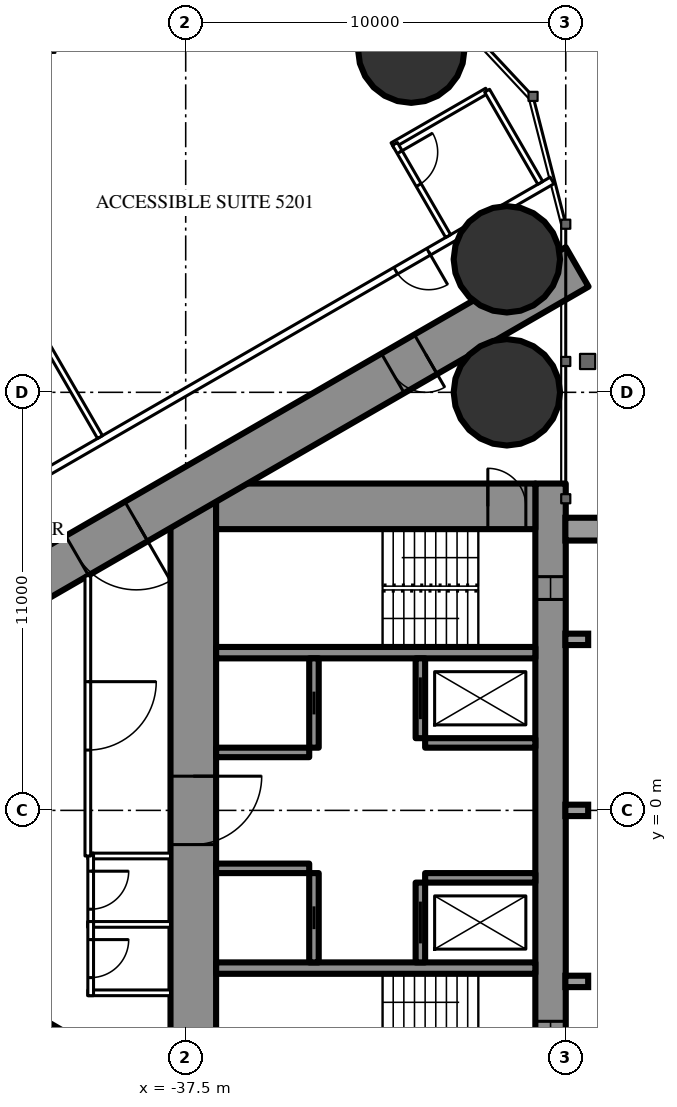
"""IFC4 building model, lengths in metres.
Left out: names, types, materials, properties, quantities, classifications, styles, units other than length and angle.
Written with IfcOpenShell. Run it as: python <this file> out.ifc"""

import sys

from ifc_helpers import new_model, si_unit, direction, frame, frame_2d, origin, origin_2d, place, context, subcontext, project, spatial, rectangle, circle, extrude, element, fill, save


model = new_model("IFC4")
c1 = context("Model", 3, precision=1e-05, world=origin(), true_north=direction((0.0, 1.0)))
c2 = subcontext(c1, "Body", "Model", "MODEL_VIEW")
j1 = project(units=[si_unit("LENGTHUNIT", "METRE"), si_unit("PLANEANGLEUNIT", "RADIAN")], contexts=[c1])
p1 = place(None, origin())
s1 = spatial("IfcSite", under=j1, at=p1, CompositionType="ELEMENT")
p2 = place(p1, origin())
s2 = spatial("IfcBuilding", under=s1, at=p2, CompositionType="ELEMENT")
p3 = place(p2, frame((0.0, 0.0, 194.8)))
s3 = spatial("IfcBuildingStorey", under=s2, at=p3, CompositionType="ELEMENT", Elevation=194.8)
for number, where, z_axis, x_axis in (
    (1, (-31.565, 20.016, 0.0), (0.0, 0.0, 1.0), (1.0, 0.0, 0.0)),
    (2, (-29.05, 11.0, 0.0), (0.0, 0.0, 1.0), (1.0, 0.0, 0.0)),
    (3, (-29.05, 14.5, 0.0), (0.0, 0.0, 1.0), (1.0, 0.0, 0.0)),
):
    element("IfcColumn", number, at=place(p3, frame(where, z_axis=z_axis, x_axis=x_axis)), inside=s3, PredefinedType="COLUMN", context=c2, shape_type="SweptSolid", body=[
        extrude(circle(Radius=1.4, at=origin_2d()), origin(), (0.0, 0.0, 1.0), 3.5),
    ])
p4 = place(p3, frame((-27.9, 8.6, 0.0), z_axis=(0.0, 0.0, 1.0), x_axis=(0.0, -1.0, 0.0)))
e4 = element("IfcWall", 4, at=p4, inside=s3, PredefinedType="SHEAR", context=c2, shape_type="SweptSolid", body=[
    extrude(rectangle(XDim=17.2, YDim=0.8, at=frame_2d((8.6, 0.0))), origin(), (0.0, 0.0, 1.0), 3.5),
])
p5 = place(p4, frame((2.45, 0.0, 0.6)))
e5 = element("IfcOpeningElement", 5, at=p5, cuts=e4, PredefinedType="OPENING", context=c2, shape_type="SweptSolid", body=[
    extrude(rectangle(XDim=0.6, YDim=2.1, at=frame_2d((0.3, 1.05))), frame((0.0, 0.41, 0.0), z_axis=(0.0, -1.0, 0.0), x_axis=(1.0, 0.0, 0.0)), (0.0, 0.0, 1.0), 0.82),
])
p6 = place(p4, frame((14.15, 0.0, 0.6)))
e6 = element("IfcOpeningElement", 6, at=p6, cuts=e4, PredefinedType="OPENING", context=c2, shape_type="SweptSolid", body=[
    extrude(rectangle(XDim=0.6, YDim=2.1, at=frame_2d((0.3, 1.05))), frame((0.0, 0.41, 0.0), z_axis=(0.0, -1.0, 0.0), x_axis=(1.0, 0.0, 0.0)), (0.0, 0.0, 1.0), 0.82),
])
p7 = place(p3, frame((-37.3, 8.6, 0.0), z_axis=(0.0, 0.0, 1.0), x_axis=(0.0, -1.0, 0.0)))
e7 = element("IfcWall", 7, at=p7, inside=s3, PredefinedType="SHEAR", context=c2, shape_type="SweptSolid", body=[
    extrude(rectangle(XDim=17.2, YDim=1.2, at=frame_2d((8.6, 0.0))), origin(), (0.0, 0.0, 1.0), 3.5),
])
p8 = place(p7, frame((7.7, 0.0, 0.0)))
e8 = element("IfcOpeningElement", 8, at=p8, cuts=e7, PredefinedType="OPENING", context=c2, shape_type="SweptSolid", body=[
    extrude(rectangle(XDim=1.8, YDim=2.2, at=frame_2d((0.9, 1.1))), frame((0.0, 0.61, 0.0), z_axis=(0.0, -1.0, 0.0), x_axis=(1.0, 0.0, 0.0)), (0.0, 0.0, 1.0), 1.22),
])
p9 = place(p3, frame((-28.3, 8.0, 0.0), z_axis=(0.0, 0.0, 1.0), x_axis=(-1.0, 0.0, 0.0)))
e9 = element("IfcWall", 9, at=p9, inside=s3, PredefinedType="SHEAR", context=c2, shape_type="SweptSolid", body=[
    extrude(rectangle(XDim=8.4, YDim=1.2, at=frame_2d((4.2, 0.0))), origin(), (0.0, 0.0, 1.0), 3.5),
])
p10 = place(p9, frame((0.25, 0.0, 0.0)))
e10 = element("IfcOpeningElement", 10, at=p10, cuts=e9, PredefinedType="OPENING", context=c2, shape_type="SweptSolid", body=[
    extrude(rectangle(XDim=1.0, YDim=2.2, at=frame_2d((0.5, 1.1))), frame((0.0, 0.61, 0.0), z_axis=(0.0, -1.0, 0.0), x_axis=(1.0, 0.0, 0.0)), (0.0, 0.0, 1.0), 1.22),
])
for number, where, z_axis, x_axis in (
    (11, (-28.3, 4.15, 0.0), (0.0, 0.0, 1.0), (-1.0, 0.0, 0.0)),
    (12, (-28.3, -4.15, 0.0), (0.0, 0.0, 1.0), (-1.0, 0.0, 0.0)),
):
    element("IfcWall", number, at=place(p3, frame(where, z_axis=z_axis, x_axis=x_axis)), inside=s3, PredefinedType="SHEAR", context=c2, shape_type="SweptSolid", body=[
        extrude(rectangle(XDim=8.4, YDim=0.3, at=frame_2d((4.2, 0.0))), origin(), (0.0, 0.0, 1.0), 3.5),
    ])
p11 = place(p3, frame((-31.325, 4.0, 0.0), z_axis=(0.0, 0.0, 1.0), x_axis=(0.0, -1.0, 0.0)))
e13 = element("IfcWall", 13, at=p11, inside=s3, PredefinedType="SHEAR", context=c2, shape_type="SweptSolid", body=[
    extrude(rectangle(XDim=2.1, YDim=0.25, at=frame_2d((1.05, 0.0))), origin(), (0.0, 0.0, 1.0), 3.5),
])
p12 = place(p11, frame((0.5, 0.0, 0.0)))
e14 = element("IfcOpeningElement", 14, at=p12, cuts=e13, PredefinedType="OPENING", context=c2, shape_type="SweptSolid", body=[
    extrude(rectangle(XDim=1.1, YDim=2.2, at=frame_2d((0.55, 1.1))), frame((0.0, 0.135, 0.0), z_axis=(0.0, -1.0, 0.0), x_axis=(1.0, 0.0, 0.0)), (0.0, 0.0, 1.0), 0.27),
])
p13 = place(p3, frame((-34.125, 4.0, 0.0), z_axis=(0.0, 0.0, 1.0), x_axis=(0.0, -1.0, 0.0)))
e15 = element("IfcWall", 15, at=p13, inside=s3, PredefinedType="SHEAR", context=c2, shape_type="SweptSolid", body=[
    extrude(rectangle(XDim=2.35, YDim=0.25, at=frame_2d((1.175, 0.0))), origin(), (0.0, 0.0, 1.0), 3.5),
])
p14 = place(p13, frame((0.875, 0.0, 0.0)))
e16 = element("IfcOpeningElement", 16, at=p14, cuts=e15, PredefinedType="OPENING", context=c2, shape_type="SweptSolid", body=[
    extrude(rectangle(XDim=0.6, YDim=2.0, at=frame_2d((0.3, 1.0))), frame((0.0, 0.135, 0.0), z_axis=(0.0, -1.0, 0.0), x_axis=(1.0, 0.0, 0.0)), (0.0, 0.0, 1.0), 0.27),
])
p15 = place(p3, frame((-28.3, 1.775, 0.0), z_axis=(0.0, 0.0, 1.0), x_axis=(-1.0, 0.0, 0.0)))
e17 = element("IfcWall", 17, at=p15, inside=s3, PredefinedType="SHEAR", context=c2, shape_type="SweptSolid", body=[
    extrude(rectangle(XDim=2.9, YDim=0.25, at=frame_2d((1.45, 0.0))), origin(), (0.0, 0.0, 1.0), 3.5),
])
p16 = place(p3, frame((-34.25, 1.525, 0.0), z_axis=(0.0, 0.0, 1.0), x_axis=(-1.0, 0.0, 0.0)))
e18 = element("IfcWall", 18, at=p16, inside=s3, PredefinedType="SHEAR", context=c2, shape_type="SweptSolid", body=[
    extrude(rectangle(XDim=2.45, YDim=0.25, at=frame_2d((1.225, 0.0))), origin(), (0.0, 0.0, 1.0), 3.5),
])
p17 = place(p3, frame((-31.325, -1.9, 0.0), z_axis=(0.0, 0.0, 1.0), x_axis=(0.0, -1.0, 0.0)))
e19 = element("IfcWall", 19, at=p17, inside=s3, PredefinedType="SHEAR", context=c2, shape_type="SweptSolid", body=[
    extrude(rectangle(XDim=2.1, YDim=0.25, at=frame_2d((1.05, 0.0))), origin(), (0.0, 0.0, 1.0), 3.5),
])
p18 = place(p17, frame((0.5, 0.0, 0.0)))
e20 = element("IfcOpeningElement", 20, at=p18, cuts=e19, PredefinedType="OPENING", context=c2, shape_type="SweptSolid", body=[
    extrude(rectangle(XDim=1.1, YDim=2.2, at=frame_2d((0.55, 1.1))), frame((0.0, 0.135, 0.0), z_axis=(0.0, -1.0, 0.0), x_axis=(1.0, 0.0, 0.0)), (0.0, 0.0, 1.0), 0.27),
])
p19 = place(p3, frame((-34.125, -1.65, 0.0), z_axis=(0.0, 0.0, 1.0), x_axis=(0.0, -1.0, 0.0)))
e21 = element("IfcWall", 21, at=p19, inside=s3, PredefinedType="SHEAR", context=c2, shape_type="SweptSolid", body=[
    extrude(rectangle(XDim=2.35, YDim=0.25, at=frame_2d((1.175, 0.0))), origin(), (0.0, 0.0, 1.0), 3.5),
])
p20 = place(p19, frame((0.875, 0.0, 0.0)))
e22 = element("IfcOpeningElement", 22, at=p20, cuts=e21, PredefinedType="OPENING", context=c2, shape_type="SweptSolid", body=[
    extrude(rectangle(XDim=0.6, YDim=2.0, at=frame_2d((0.3, 1.0))), frame((0.0, 0.135, 0.0), z_axis=(0.0, -1.0, 0.0), x_axis=(1.0, 0.0, 0.0)), (0.0, 0.0, 1.0), 0.27),
])
p21 = place(p3, frame((-28.3, -1.775, 0.0), z_axis=(0.0, 0.0, 1.0), x_axis=(-1.0, 0.0, 0.0)))
e23 = element("IfcWall", 23, at=p21, inside=s3, PredefinedType="SHEAR", context=c2, shape_type="SweptSolid", body=[
    extrude(rectangle(XDim=2.9, YDim=0.25, at=frame_2d((1.45, 0.0))), origin(), (0.0, 0.0, 1.0), 3.5),
])
p22 = place(p3, frame((-34.25, -1.525, 0.0), z_axis=(0.0, 0.0, 1.0), x_axis=(-1.0, 0.0, 0.0)))
e24 = element("IfcWall", 24, at=p22, inside=s3, PredefinedType="SHEAR", context=c2, shape_type="SweptSolid", body=[
    extrude(rectangle(XDim=2.45, YDim=0.25, at=frame_2d((1.225, 0.0))), origin(), (0.0, 0.0, 1.0), 3.5),
])
p23 = place(p3, frame((-27.2, 14.3, 0.0), z_axis=(0.0, 0.0, 1.0), x_axis=(-0.866026593062, -0.499997940104, 0.0)))
e25 = element("IfcWall", 25, at=p23, inside=s3, PredefinedType="SHEAR", context=c2, shape_type="SweptSolid", body=[
    extrude(rectangle(XDim=28.946, YDim=1.2, at=frame_2d((14.473, 0.0))), origin(), (0.0, 0.0, 1.0), 3.5),
])
p24 = place(p23, frame((4.6, 0.0, 0.0)))
e26 = element("IfcOpeningElement", 26, at=p24, cuts=e25, PredefinedType="OPENING", context=c2, shape_type="SweptSolid", body=[
    extrude(rectangle(XDim=1.0, YDim=2.2, at=frame_2d((0.5, 1.1))), frame((0.0, 0.61, 0.0), z_axis=(0.0, -1.0, 0.0), x_axis=(1.0, 0.0, 0.0)), (0.0, 0.0, 1.0), 1.22),
])
p25 = place(p23, frame((13.395, 0.0, 0.0)))
e27 = element("IfcOpeningElement", 27, at=p25, cuts=e25, PredefinedType="OPENING", context=c2, shape_type="SweptSolid", body=[
    extrude(rectangle(XDim=1.8, YDim=2.2, at=frame_2d((0.9, 1.1))), frame((0.0, 0.61, 0.0), z_axis=(0.0, -1.0, 0.0), x_axis=(1.0, 0.0, 0.0)), (0.0, 0.0, 1.0), 1.22),
])
p26 = place(p3, frame((-27.2, -14.3, 0.0), z_axis=(0.0, 0.0, 1.0), x_axis=(-0.866024021859, 0.500002393557, 0.0)))
e28 = element("IfcWall", 28, at=p26, inside=s3, PredefinedType="SHEAR", context=c2, shape_type="SweptSolid", body=[
    extrude(rectangle(XDim=27.907, YDim=1.2, at=frame_2d((13.954, 0.0))), origin(), (0.0, 0.0, 1.0), 3.5),
])
p27 = place(p26, frame((4.6, 0.0, 0.0)))
e29 = element("IfcOpeningElement", 29, at=p27, cuts=e28, PredefinedType="OPENING", context=c2, shape_type="SweptSolid", body=[
    extrude(rectangle(XDim=1.0, YDim=2.2, at=frame_2d((0.5, 1.1))), frame((0.0, 0.61, 0.0), z_axis=(0.0, -1.0, 0.0), x_axis=(1.0, 0.0, 0.0)), (0.0, 0.0, 1.0), 1.22),
])
p28 = place(p26, frame((13.395, 0.0, 0.0)))
e30 = element("IfcOpeningElement", 30, at=p28, cuts=e28, PredefinedType="OPENING", context=c2, shape_type="SweptSolid", body=[
    extrude(rectangle(XDim=1.8, YDim=2.2, at=frame_2d((0.9, 1.1))), frame((0.0, 0.61, 0.0), z_axis=(0.0, -1.0, 0.0), x_axis=(1.0, 0.0, 0.0)), (0.0, 0.0, 1.0), 1.22),
])
p29 = place(p3, frame((-27.86, 16.575, 0.0), z_axis=(0.0, 0.0, 1.0), x_axis=(-0.866025533911, -0.499999774615, 0.0)))
e31 = element("IfcWall", 31, at=p29, inside=s3, PredefinedType="PARTITIONING", context=c2, shape_type="SweptSolid", body=[
    extrude(rectangle(XDim=33.149, YDim=0.2, at=frame_2d((16.575, 0.0))), origin(), (0.0, 0.0, 1.0), 3.25),
])
p30 = place(p29, frame((3.75, 0.0, 0.0)))
e32 = element("IfcOpeningElement", 32, at=p30, cuts=e31, PredefinedType="OPENING", context=c2, shape_type="SweptSolid", body=[
    extrude(rectangle(XDim=1.0, YDim=2.2, at=frame_2d((0.5, 1.1))), frame((0.0, 0.11, 0.0), z_axis=(0.0, -1.0, 0.0), x_axis=(1.0, 0.0, 0.0)), (0.0, 0.0, 1.0), 0.22),
])
p31 = place(p29, frame((16.402, 0.0, 0.0)))
e33 = element("IfcOpeningElement", 33, at=p31, cuts=e31, PredefinedType="OPENING", context=c2, shape_type="SweptSolid", body=[
    extrude(rectangle(XDim=0.95, YDim=2.2, at=frame_2d((0.475, 1.1))), frame((0.0, 0.11, 0.0), z_axis=(0.0, -1.0, 0.0), x_axis=(1.0, 0.0, 0.0)), (0.0, 0.0, 1.0), 0.22),
])
p32 = place(p29, frame((22.047, 0.0, 0.0)))
e34 = element("IfcOpeningElement", 34, at=p32, cuts=e31, PredefinedType="OPENING", context=c2, shape_type="SweptSolid", body=[
    extrude(rectangle(XDim=0.95, YDim=2.2, at=frame_2d((0.475, 1.1))), frame((0.0, 0.11, 0.0), z_axis=(0.0, -1.0, 0.0), x_axis=(1.0, 0.0, 0.0)), (0.0, 0.0, 1.0), 0.22),
])
p33 = place(p29, frame((30.396, 0.0, 0.0)))
e35 = element("IfcOpeningElement", 35, at=p33, cuts=e31, PredefinedType="OPENING", context=c2, shape_type="SweptSolid", body=[
    extrude(rectangle(XDim=1.8, YDim=2.2, at=frame_2d((0.9, 1.1))), frame((0.0, 0.11, 0.0), z_axis=(0.0, -1.0, 0.0), x_axis=(1.0, 0.0, 0.0)), (0.0, 0.0, 1.0), 0.22),
])
p34 = place(p3, frame((-39.754, 9.823, 0.0), z_axis=(0.0, 0.0, 1.0), x_axis=(-0.499997670926, 0.866026748472, 0.0)))
e36 = element("IfcWall", 36, at=p34, inside=s3, PredefinedType="PARTITIONING", context=c2, shape_type="SweptSolid", body=[
    extrude(rectangle(XDim=6.757, YDim=0.15, at=frame_2d((3.379, 0.0))), origin(), (0.0, 0.0, 1.0), 2.3),
])
p35 = place(p3, frame((-29.57, 18.936, 0.0), z_axis=(0.0, 0.0, 1.0), x_axis=(-0.866018712932, -0.500011588718, 0.0)))
e37 = element("IfcWall", 37, at=p35, inside=s3, PredefinedType="PARTITIONING", context=c2, shape_type="SweptSolid", body=[
    extrude(rectangle(XDim=2.875, YDim=0.15, at=frame_2d((1.438, 0.0))), origin(), (0.0, 0.0, 1.0), 3.25),
])
p36 = place(p3, frame((-30.595, 15.111, 0.0), z_axis=(0.0, 0.0, 1.0), x_axis=(-0.49998411664, 0.866034573852, 0.0)))
e38 = element("IfcWall", 38, at=p36, inside=s3, PredefinedType="PARTITIONING", context=c2, shape_type="SweptSolid", body=[
    extrude(rectangle(XDim=2.8, YDim=0.15, at=frame_2d((1.4, 0.0))), origin(), (0.0, 0.0, 1.0), 3.25),
])
p37 = place(p36, frame((1.55, 0.0, 0.0)))
e39 = element("IfcOpeningElement", 39, at=p37, cuts=e38, PredefinedType="OPENING", context=c2, shape_type="SweptSolid", body=[
    extrude(rectangle(XDim=1.0, YDim=2.2, at=frame_2d((0.5, 1.1))), frame((0.0, 0.085, 0.0), z_axis=(0.0, -1.0, 0.0), x_axis=(1.0, 0.0, 0.0)), (0.0, 0.0, 1.0), 0.17),
])
p38 = place(p3, frame((-28.17, 16.511, 0.0), z_axis=(0.0, 0.0, 1.0), x_axis=(-0.49994636267, 0.866056369097, 0.0)))
e40 = element("IfcWall", 40, at=p38, inside=s3, PredefinedType="PARTITIONING", context=c2, shape_type="SweptSolid", body=[
    extrude(rectangle(XDim=2.8, YDim=0.15, at=frame_2d((1.4, 0.0))), origin(), (0.0, 0.0, 1.0), 3.25),
])
for number, where, z_axis, x_axis in (
    (41, (-37.9, -1.2, 0.0), (0.0, 0.0, 1.0), (-1.0, 0.0, 0.0)),
    (42, (-37.9, -3.0, 0.0), (0.0, 0.0, 1.0), (-1.0, 0.0, 0.0)),
    (43, (-37.9, -4.8, 0.0), (0.0, 0.0, 1.0), (-1.0, 0.0, 0.0)),
):
    element("IfcWall", number, at=place(p3, frame(where, z_axis=z_axis, x_axis=x_axis)), inside=s3, PredefinedType="PARTITIONING", context=c2, shape_type="SweptSolid", body=[
        extrude(rectangle(XDim=2.175, YDim=0.15, at=frame_2d((1.087, 0.0))), origin(), (0.0, 0.0, 1.0), 3.25),
    ])
p39 = place(p3, frame((-40.0, -1.125, 0.0), z_axis=(0.0, 0.0, 1.0), x_axis=(0.0, -1.0, 0.0)))
e44 = element("IfcWall", 44, at=p39, inside=s3, PredefinedType="PARTITIONING", context=c2, shape_type="SweptSolid", body=[
    extrude(rectangle(XDim=1.95, YDim=0.15, at=frame_2d((0.975, 0.0))), origin(), (0.0, 0.0, 1.0), 3.25),
])
p40 = place(p39, frame((0.475, 0.0, 0.0)))
e45 = element("IfcOpeningElement", 45, at=p40, cuts=e44, PredefinedType="OPENING", context=c2, shape_type="SweptSolid", body=[
    extrude(rectangle(XDim=1.0, YDim=2.2, at=frame_2d((0.5, 1.1))), frame((0.0, 0.085, 0.0), z_axis=(0.0, -1.0, 0.0), x_axis=(1.0, 0.0, 0.0)), (0.0, 0.0, 1.0), 0.17),
])
p41 = place(p3, frame((-40.0, -2.925, 0.0), z_axis=(0.0, 0.0, 1.0), x_axis=(0.0, -1.0, 0.0)))
e46 = element("IfcWall", 46, at=p41, inside=s3, PredefinedType="PARTITIONING", context=c2, shape_type="SweptSolid", body=[
    extrude(rectangle(XDim=1.95, YDim=0.15, at=frame_2d((0.975, 0.0))), origin(), (0.0, 0.0, 1.0), 3.25),
])
p42 = place(p41, frame((0.475, 0.0, 0.0)))
e47 = element("IfcOpeningElement", 47, at=p42, cuts=e46, PredefinedType="OPENING", context=c2, shape_type="SweptSolid", body=[
    extrude(rectangle(XDim=1.0, YDim=2.2, at=frame_2d((0.5, 1.1))), frame((0.0, 0.085, 0.0), z_axis=(0.0, -1.0, 0.0), x_axis=(1.0, 0.0, 0.0)), (0.0, 0.0, 1.0), 0.17),
])
p43 = place(p3, frame((-40.075, 6.174, 0.0), z_axis=(0.0, 0.0, 1.0), x_axis=(0.0, -1.0, 0.0)))
e48 = element("IfcWall", 48, at=p43, inside=s3, PredefinedType="PARTITIONING", context=c2, shape_type="SweptSolid", body=[
    extrude(rectangle(XDim=7.374, YDim=0.15, at=frame_2d((3.687, 0.0))), origin(), (0.0, 0.0, 1.0), 3.25),
])
p44 = place(p43, frame((2.787, 0.0, 0.0)))
e49 = element("IfcOpeningElement", 49, at=p44, cuts=e48, PredefinedType="OPENING", context=c2, shape_type="SweptSolid", body=[
    extrude(rectangle(XDim=1.8, YDim=2.2, at=frame_2d((0.9, 1.1))), frame((0.0, 0.085, 0.0), z_axis=(0.0, -1.0, 0.0), x_axis=(1.0, 0.0, 0.0)), (0.0, 0.0, 1.0), 0.17),
])
p45 = place(p37, origin())
e50 = element("IfcDoor", 50, at=p45, inside=s3, OperationType="SINGLE_SWING_RIGHT", PredefinedType="DOOR", context=c2, shape_type="SweptSolid", body=[
    extrude(rectangle(XDim=1.0, YDim=2.2, at=frame_2d((0.5, 1.1))), frame((0.0, 0.025, 0.0), z_axis=(0.0, -1.0, 0.0), x_axis=(1.0, 0.0, 0.0)), (0.0, 0.0, 1.0), 0.05),
])
fill(e39, e50)
p46 = place(p30, origin())
e51 = element("IfcDoor", 51, at=p46, inside=s3, OperationType="SINGLE_SWING_LEFT", PredefinedType="DOOR", context=c2, shape_type="SweptSolid", body=[
    extrude(rectangle(XDim=1.0, YDim=2.2, at=frame_2d((0.5, 1.1))), frame((0.0, 0.025, 0.0), z_axis=(0.0, -1.0, 0.0), x_axis=(1.0, 0.0, 0.0)), (0.0, 0.0, 1.0), 0.05),
])
fill(e32, e51)
p47 = place(p40, origin())
e52 = element("IfcDoor", 52, at=p47, inside=s3, OperationType="SINGLE_SWING_LEFT", PredefinedType="DOOR", context=c2, shape_type="SweptSolid", body=[
    extrude(rectangle(XDim=1.0, YDim=2.2, at=frame_2d((0.5, 1.1))), frame((0.0, 0.025, 0.0), z_axis=(0.0, -1.0, 0.0), x_axis=(1.0, 0.0, 0.0)), (0.0, 0.0, 1.0), 0.05),
])
fill(e45, e52)
p48 = place(p42, origin())
e53 = element("IfcDoor", 53, at=p48, inside=s3, OperationType="SINGLE_SWING_LEFT", PredefinedType="DOOR", context=c2, shape_type="SweptSolid", body=[
    extrude(rectangle(XDim=1.0, YDim=2.2, at=frame_2d((0.5, 1.1))), frame((0.0, 0.025, 0.0), z_axis=(0.0, -1.0, 0.0), x_axis=(1.0, 0.0, 0.0)), (0.0, 0.0, 1.0), 0.05),
])
fill(e47, e53)
p49 = place(p44, origin())
e54 = element("IfcDoor", 54, at=p49, inside=s3, OperationType="DOUBLE_DOOR_SINGLE_SWING", PredefinedType="DOOR", context=c2, shape_type="SweptSolid", body=[
    extrude(rectangle(XDim=1.8, YDim=2.2, at=frame_2d((0.9, 1.1))), frame((0.0, 0.025, 0.0), z_axis=(0.0, -1.0, 0.0), x_axis=(1.0, 0.0, 0.0)), (0.0, 0.0, 1.0), 0.05),
])
fill(e49, e54)
p50 = place(p24, origin())
e55 = element("IfcDoor", 55, at=p50, inside=s3, OperationType="SINGLE_SWING_LEFT", PredefinedType="DOOR", context=c2, shape_type="SweptSolid", body=[
    extrude(rectangle(XDim=1.0, YDim=2.2, at=frame_2d((0.5, 1.1))), frame((0.0, 0.025, 0.0), z_axis=(0.0, -1.0, 0.0), x_axis=(1.0, 0.0, 0.0)), (0.0, 0.0, 1.0), 0.05),
])
fill(e26, e55)
p51 = place(p25, origin())
e56 = element("IfcDoor", 56, at=p51, inside=s3, OperationType="DOUBLE_DOOR_SINGLE_SWING", PredefinedType="DOOR", context=c2, shape_type="SweptSolid", body=[
    extrude(rectangle(XDim=1.8, YDim=2.2, at=frame_2d((0.9, 1.1))), frame((0.0, 0.025, 0.0), z_axis=(0.0, -1.0, 0.0), x_axis=(1.0, 0.0, 0.0)), (0.0, 0.0, 1.0), 0.05),
])
fill(e27, e56)
p52 = place(p8, origin())
e57 = element("IfcDoor", 57, at=p52, inside=s3, OperationType="DOUBLE_DOOR_SINGLE_SWING", PredefinedType="DOOR", context=c2, shape_type="SweptSolid", body=[
    extrude(rectangle(XDim=1.8, YDim=2.2, at=frame_2d((0.9, 1.1))), frame((0.0, 0.025, 0.0), z_axis=(0.0, -1.0, 0.0), x_axis=(1.0, 0.0, 0.0)), (0.0, 0.0, 1.0), 0.05),
])
fill(e8, e57)
p53 = place(p10, origin())
e58 = element("IfcDoor", 58, at=p53, inside=s3, OperationType="SINGLE_SWING_RIGHT", PredefinedType="DOOR", context=c2, shape_type="SweptSolid", body=[
    extrude(rectangle(XDim=1.0, YDim=2.2, at=frame_2d((0.5, 1.1))), frame((0.0, 0.025, 0.0), z_axis=(0.0, -1.0, 0.0), x_axis=(1.0, 0.0, 0.0)), (0.0, 0.0, 1.0), 0.05),
])
fill(e10, e58)
p54 = place(p12, origin())
e59 = element("IfcDoor", 59, at=p54, inside=s3, OperationType="SLIDING_TO_LEFT", PredefinedType="USERDEFINED", context=c2, shape_type="SweptSolid", body=[
    extrude(rectangle(XDim=1.1, YDim=2.2, at=frame_2d((0.55, 1.1))), frame((0.0, 0.025, 0.0), z_axis=(0.0, -1.0, 0.0), x_axis=(1.0, 0.0, 0.0)), (0.0, 0.0, 1.0), 0.05),
])
fill(e14, e59)
p55 = place(p18, origin())
e60 = element("IfcDoor", 60, at=p55, inside=s3, OperationType="SLIDING_TO_LEFT", PredefinedType="USERDEFINED", context=c2, shape_type="SweptSolid", body=[
    extrude(rectangle(XDim=1.1, YDim=2.2, at=frame_2d((0.55, 1.1))), frame((0.0, 0.025, 0.0), z_axis=(0.0, -1.0, 0.0), x_axis=(1.0, 0.0, 0.0)), (0.0, 0.0, 1.0), 0.05),
])
fill(e20, e60)
p56 = place(p14, origin())
e61 = element("IfcDoor", 61, at=p56, inside=s3, OperationType="SLIDING_TO_LEFT", PredefinedType="DOOR", context=c2, shape_type="SweptSolid", body=[
    extrude(rectangle(XDim=0.6, YDim=2.0, at=frame_2d((0.3, 1.0))), frame((0.0, 0.025, 0.0), z_axis=(0.0, -1.0, 0.0), x_axis=(1.0, 0.0, 0.0)), (0.0, 0.0, 1.0), 0.05),
])
fill(e16, e61)
p57 = place(p20, origin())
e62 = element("IfcDoor", 62, at=p57, inside=s3, OperationType="SLIDING_TO_LEFT", PredefinedType="DOOR", context=c2, shape_type="SweptSolid", body=[
    extrude(rectangle(XDim=0.6, YDim=2.0, at=frame_2d((0.3, 1.0))), frame((0.0, 0.025, 0.0), z_axis=(0.0, -1.0, 0.0), x_axis=(1.0, 0.0, 0.0)), (0.0, 0.0, 1.0), 0.05),
])
fill(e22, e62)
p58 = place(p5, origin())
e63 = element("IfcWindow", 63, at=p58, inside=s3, PartitioningType="SINGLE_PANEL", PredefinedType="WINDOW", context=c2, shape_type="SweptSolid", body=[
    extrude(rectangle(XDim=0.6, YDim=2.1, at=frame_2d((0.3, 1.05))), frame((0.0, 0.03, 0.0), z_axis=(0.0, -1.0, 0.0), x_axis=(1.0, 0.0, 0.0)), (0.0, 0.0, 1.0), 0.06),
])
fill(e5, e63)
p59 = place(p6, origin())
e64 = element("IfcWindow", 64, at=p59, inside=s3, PartitioningType="SINGLE_PANEL", PredefinedType="WINDOW", context=c2, shape_type="SweptSolid", body=[
    extrude(rectangle(XDim=0.6, YDim=2.1, at=frame_2d((0.3, 1.05))), frame((0.0, 0.03, 0.0), z_axis=(0.0, -1.0, 0.0), x_axis=(1.0, 0.0, 0.0)), (0.0, 0.0, 1.0), 0.06),
])
fill(e6, e64)
save(model, sys.argv[1])
